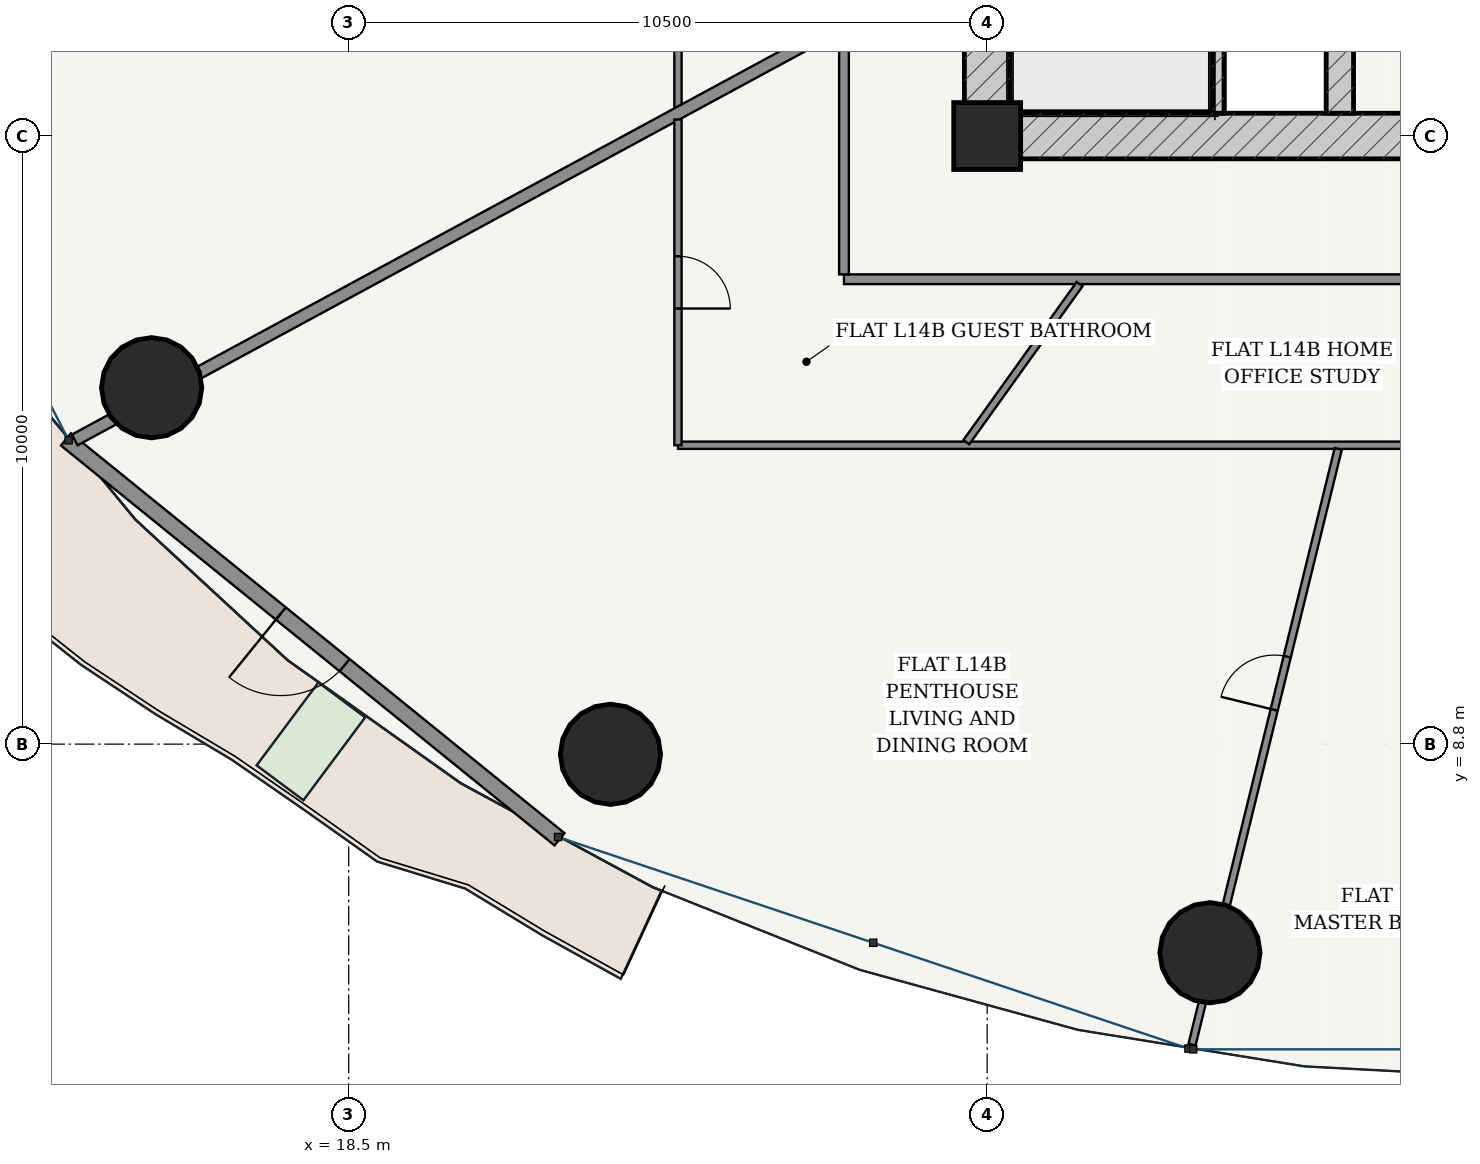
"""IFC4 building model, lengths in metres.
Left out: names, types, materials, properties, quantities, classifications, styles, units other than length and angle.
Written with IfcOpenShell. Run it as: python <this file> out.ifc"""

import sys

from ifc_helpers import new_model, si_unit, direction, frame, frame_2d, origin, origin_2d, place, context, subcontext, project, spatial, rectangle, hollow_circle, extrude, source, transform, mapped, element, fill, save


model = new_model("IFC4")
c1 = context("Model", 3, precision=1e-05, world=origin(), true_north=direction((-0.2419218956, 0.970295726276)))
c2 = subcontext(c1, "Body", "Model", "MODEL_VIEW")
j1 = project(units=[si_unit("LENGTHUNIT", "METRE"), si_unit("PLANEANGLEUNIT", "RADIAN")], contexts=[c1])
p1 = place(None, origin())
s1 = spatial("IfcSite", under=j1, at=p1, CompositionType="ELEMENT")
p2 = place(p1, origin())
s2 = spatial("IfcBuilding", under=s1, at=p2, CompositionType="ELEMENT")
p3 = place(p2, frame((0.0, 0.0, 56.4)))
s3 = spatial("IfcBuildingStorey", under=s2, at=p3, CompositionType="ELEMENT", Elevation=56.4)
p4 = place(p3, frame((29.0, 18.8, 0.0), z_axis=(0.0, 0.0, 1.0), x_axis=(1.0, 0.0, 0.0)))
e1 = element("IfcColumn", 1, at=p4, inside=s3, PredefinedType="COLUMN", context=c2, shape_type="SweptSolid", body=[
    extrude(rectangle(XDim=1.1, YDim=1.1, at=origin_2d()), origin(), (0.0, 0.0, 1.0), 3.6),
])
p5 = place(p3, frame((28.625, 18.8, 0.0), z_axis=(0.0, 0.0, 1.0), x_axis=(1.0, 0.0, 0.0)))
e2 = element("IfcWall", 2, at=p5, inside=s3, PredefinedType="SHEAR", context=c2, shape_type="SweptSolid", body=[
    extrude(rectangle(XDim=18.75, YDim=0.75, at=frame_2d((9.375, 0.0))), origin(), (0.0, 0.0, 1.0), 3.32),
])
p6 = place(p5, frame((8.95, 0.0, 0.0)))
e3 = element("IfcOpeningElement", 3, at=p6, cuts=e2, PredefinedType="OPENING", context=c2, shape_type="SweptSolid", body=[
    extrude(rectangle(XDim=0.85, YDim=2.1, at=frame_2d((0.425, 1.05))), frame((0.0, 0.385, 0.0), z_axis=(0.0, -1.0, 0.0), x_axis=(1.0, 0.0, 0.0)), (0.0, 0.0, 1.0), 0.77),
])
p7 = place(p3, frame((29.0, 19.175, 0.0), z_axis=(0.0, 0.0, 1.0), x_axis=(0.0, 1.0, 0.0)))
e4 = element("IfcWall", 4, at=p7, inside=s3, PredefinedType="SHEAR", context=c2, shape_type="SweptSolid", body=[
    extrude(rectangle(XDim=15.25, YDim=0.75, at=frame_2d((7.625, 0.0))), origin(), (0.0, 0.0, 1.0), 3.32),
])
p8 = place(p7, frame((9.875, 0.0, 0.0)))
e5 = element("IfcOpeningElement", 5, at=p8, cuts=e4, PredefinedType="OPENING", context=c2, shape_type="SweptSolid", body=[
    extrude(rectangle(XDim=1.5, YDim=2.2, at=frame_2d((0.75, 1.1))), frame((0.0, 0.385, 0.0), z_axis=(0.0, -1.0, 0.0), x_axis=(1.0, 0.0, 0.0)), (0.0, 0.0, 1.0), 0.77),
])
p9 = place(p3, frame((32.795, 19.175, 0.0), z_axis=(0.0, 0.0, 1.0), x_axis=(0.0, 1.0, 0.0)))
e6 = element("IfcWall", 6, at=p9, inside=s3, PredefinedType="SOLIDWALL", context=c2, shape_type="SweptSolid", body=[
    extrude(rectangle(XDim=7.375, YDim=0.2, at=frame_2d((3.688, 0.0))), origin(), (0.0, 0.0, 1.0), 3.32),
])
p10 = place(p3, frame((34.8, 19.175, 0.0), z_axis=(0.0, 0.0, 1.0), x_axis=(0.0, 1.0, 0.0)))
e7 = element("IfcWall", 7, at=p10, inside=s3, PredefinedType="SHEAR", context=c2, shape_type="SweptSolid", body=[
    extrude(rectangle(XDim=15.25, YDim=0.45, at=frame_2d((7.625, 0.0))), origin(), (0.0, 0.0, 1.0), 3.32),
])
p11 = place(p10, frame((7.8, 0.0, 0.0)))
e8 = element("IfcOpeningElement", 8, at=p11, cuts=e7, PredefinedType="OPENING", context=c2, shape_type="SweptSolid", body=[
    extrude(rectangle(XDim=1.05, YDim=2.15, at=frame_2d((0.525, 1.075))), frame((0.0, 0.235, 0.0), z_axis=(0.0, -1.0, 0.0), x_axis=(1.0, 0.0, 0.0)), (0.0, 0.0, 1.0), 0.47),
])
for number, where, z_axis, x_axis in (
    (9, (15.259, 14.661, 0.0), (0.0, 0.0, 1.0), (1.0, 0.0, 0.0)),
    (10, (22.805, 8.632, 0.0), (0.0, 0.0, 1.0), (1.0, 0.0, 0.0)),
    (11, (32.664, 5.37, 0.0), (0.0, 0.0, 1.0), (1.0, 0.0, 0.0)),
):
    element("IfcColumn", number, at=place(p3, frame(where, z_axis=z_axis, x_axis=x_axis)), inside=s3, PredefinedType="COLUMN", context=c2, shape_type="SweptSolid", body=[
        extrude(hollow_circle(Radius=0.825, WallThickness=0.05, at=origin_2d()), origin(), (0.0, 0.0, 1.0), 3.6),
    ])
p12 = place(p3, frame((13.85, 13.811, 0.0), z_axis=(0.0, 0.0, 1.0), x_axis=(0.777016782851, -0.629479879875, 0.0)))
e12 = element("IfcWall", 12, at=p12, inside=s3, PredefinedType="SOLIDWALL", context=c2, shape_type="SweptSolid", body=[
    extrude(rectangle(XDim=10.447, YDim=0.26, at=frame_2d((5.223, 0.0))), origin(), (0.0, 0.0, 1.0), 3.32),
])
p13 = place(p12, frame((4.548, 0.0, 0.0)))
e13 = element("IfcOpeningElement", 13, at=p13, cuts=e12, PredefinedType="OPENING", context=c2, shape_type="SweptSolid", body=[
    extrude(rectangle(XDim=1.35, YDim=2.2, at=frame_2d((0.675, 1.1))), frame((0.0, 0.14, 0.0), z_axis=(0.0, -1.0, 0.0), x_axis=(1.0, 0.0, 0.0)), (0.0, 0.0, 1.0), 0.28),
])
p14 = place(p3, frame((26.645, 16.445, 0.0), z_axis=(0.0, 0.0, 1.0), x_axis=(1.0, 0.0, 0.0)))
e14 = element("IfcWall", 14, at=p14, inside=s3, PredefinedType="PARTITIONING", context=c2, shape_type="SweptSolid", body=[
    extrude(rectangle(XDim=22.71, YDim=0.16, at=frame_2d((11.355, 0.0))), origin(), (0.0, 0.0, 1.0), 2.688),
])
p15 = place(p3, frame((26.645, 16.525, 0.0), z_axis=(0.0, 0.0, 1.0), x_axis=(0.0, 1.0, 0.0)))
e15 = element("IfcWall", 15, at=p15, inside=s3, PredefinedType="PARTITIONING", context=c2, shape_type="SweptSolid", body=[
    extrude(rectangle(XDim=20.55, YDim=0.16, at=frame_2d((10.275, 0.0))), origin(), (0.0, 0.0, 1.0), 2.688),
])
p16 = place(p15, frame((16.837, 0.0, 0.0)))
e16 = element("IfcOpeningElement", 16, at=p16, cuts=e15, PredefinedType="OPENING", context=c2, shape_type="SweptSolid", body=[
    extrude(rectangle(XDim=0.98, YDim=2.2, at=frame_2d((0.49, 1.1))), frame((0.0, 0.09, 0.0), z_axis=(0.0, -1.0, 0.0), x_axis=(1.0, 0.0, 0.0)), (0.0, 0.0, 1.0), 0.18),
])
p17 = place(p3, frame((23.915, 19.276, 0.0), z_axis=(0.0, 0.0, 1.0), x_axis=(0.0, 1.0, 0.0)))
e17 = element("IfcWall", 17, at=p17, inside=s3, PredefinedType="PARTITIONING", context=c2, shape_type="SweptSolid", body=[
    extrude(rectangle(XDim=20.609, YDim=0.12, at=frame_2d((10.305, 0.0))), origin(), (0.0, 0.0, 1.0), 2.688),
])
p18 = place(p17, frame((15.972, 0.0, 0.0)))
e18 = element("IfcOpeningElement", 18, at=p18, cuts=e17, PredefinedType="OPENING", context=c2, shape_type="SweptSolid", body=[
    extrude(rectangle(XDim=0.9, YDim=2.15, at=frame_2d((0.45, 1.075))), frame((0.0, 0.07, 0.0), z_axis=(0.0, -1.0, 0.0), x_axis=(1.0, 0.0, 0.0)), (0.0, 0.0, 1.0), 0.14),
])
p19 = place(p17, frame((3.058, 0.0, 0.0)))
e19 = element("IfcOpeningElement", 19, at=p19, cuts=e17, PredefinedType="OPENING", context=c2, shape_type="SweptSolid", body=[
    extrude(rectangle(XDim=0.9, YDim=2.15, at=frame_2d((0.45, 1.075))), frame((0.0, 0.07, 0.0), z_axis=(0.0, -1.0, 0.0), x_axis=(1.0, 0.0, 0.0)), (0.0, 0.0, 1.0), 0.14),
])
p20 = place(p3, frame((26.565, 20.608, 0.0), z_axis=(0.0, 0.0, 1.0), x_axis=(-0.879369737803, -0.476139542819, 0.0)))
e20 = element("IfcWall", 20, at=p20, inside=s3, PredefinedType="PARTITIONING", context=c2, shape_type="SweptSolid", body=[
    extrude(rectangle(XDim=14.295, YDim=0.2, at=frame_2d((7.147, 0.0))), origin(), (0.0, 0.0, 1.0), 2.688),
])
p21 = place(p3, frame((52.085, 13.715, 0.0), z_axis=(0.0, 0.0, 1.0), x_axis=(-1.0, 0.0, 0.0)))
e21 = element("IfcWall", 21, at=p21, inside=s3, PredefinedType="PARTITIONING", context=c2, shape_type="SweptSolid", body=[
    extrude(rectangle(XDim=28.17, YDim=0.12, at=frame_2d((14.085, 0.0))), origin(), (0.0, 0.0, 1.0), 2.688),
])
p22 = place(p21, frame((12.891, 0.0, 0.0)))
e22 = element("IfcOpeningElement", 22, at=p22, cuts=e21, PredefinedType="OPENING", context=c2, shape_type="SweptSolid", body=[
    extrude(rectangle(XDim=0.9, YDim=2.15, at=frame_2d((0.45, 1.075))), frame((0.0, 0.07, 0.0), z_axis=(0.0, -1.0, 0.0), x_axis=(1.0, 0.0, 0.0)), (0.0, 0.0, 1.0), 0.14),
])
p23 = place(p3, frame((23.915, 13.715, 0.0), z_axis=(0.0, 0.0, 1.0), x_axis=(0.0, 1.0, 0.0)))
e23 = element("IfcWall", 23, at=p23, inside=s3, PredefinedType="PARTITIONING", context=c2, shape_type="SweptSolid", body=[
    extrude(rectangle(XDim=5.356, YDim=0.12, at=frame_2d((2.678, 0.0))), origin(), (0.0, 0.0, 1.0), 2.999),
])
p24 = place(p23, frame((2.248, 0.0, 0.0)))
e24 = element("IfcOpeningElement", 24, at=p24, cuts=e23, PredefinedType="OPENING", context=c2, shape_type="SweptSolid", body=[
    extrude(rectangle(XDim=0.86, YDim=2.15, at=frame_2d((0.43, 1.075))), frame((0.0, 0.07, 0.0), z_axis=(0.0, -1.0, 0.0), x_axis=(1.0, 0.0, 0.0)), (0.0, 0.0, 1.0), 0.14),
])
p25 = place(p3, frame((34.773, 13.655, 0.0), z_axis=(0.0, 0.0, 1.0), x_axis=(-0.238375747469, -0.97117300365, 0.0)))
e25 = element("IfcWall", 25, at=p25, inside=s3, PredefinedType="PARTITIONING", context=c2, shape_type="SweptSolid", body=[
    extrude(rectangle(XDim=10.086, YDim=0.12, at=frame_2d((5.043, 0.0))), origin(), (0.0, 0.0, 1.0), 2.688),
])
p26 = place(p25, frame((3.518, 0.0, 0.0)))
e26 = element("IfcOpeningElement", 26, at=p26, cuts=e25, PredefinedType="OPENING", context=c2, shape_type="SweptSolid", body=[
    extrude(rectangle(XDim=0.9, YDim=2.15, at=frame_2d((0.45, 1.075))), frame((0.0, 0.07, 0.0), z_axis=(0.0, -1.0, 0.0), x_axis=(1.0, 0.0, 0.0)), (0.0, 0.0, 1.0), 0.14),
])
p27 = place(p3, frame((30.52, 16.365, 0.0), z_axis=(0.0, 0.0, 1.0), x_axis=(-0.582566008831, -0.812783393872, 0.0)))
e27 = element("IfcWall", 27, at=p27, inside=s3, PredefinedType="PARTITIONING", context=c2, shape_type="SweptSolid", body=[
    extrude(rectangle(XDim=3.198, YDim=0.12, at=frame_2d((1.599, 0.0))), origin(), (0.0, 0.0, 1.0), 3.32),
])
m1 = source(origin(), c2, "Body", "SweptSolid", [
    extrude(rectangle(XDim=1.35, YDim=2.2, at=frame_2d((0.675, 1.1))), frame((0.0, 0.025, 0.0), z_axis=(0.0, -1.0, 0.0), x_axis=(1.0, 0.0, 0.0)), (0.0, 0.0, 1.0), 0.05),
])
p28 = place(p13, frame((1.35, 0.0, 0.0), z_axis=(0.0, 0.0, 1.0), x_axis=(-1.0, 0.0, 0.0)))
e28 = element("IfcDoor", 28, at=p28, inside=s3, OperationType="SINGLE_SWING_RIGHT", PredefinedType="DOOR", context=c2, shape_type="MappedRepresentation", body=[
    mapped(m1, transform((0.0, 0.0, 0.0), scale=1.0)),
])
fill(e13, e28)
m2 = source(origin(), c2, "Body", "SweptSolid", [
    extrude(rectangle(XDim=0.9, YDim=2.15, at=frame_2d((0.45, 1.075))), frame((0.0, 0.025, 0.0), z_axis=(0.0, -1.0, 0.0), x_axis=(1.0, 0.0, 0.0)), (0.0, 0.0, 1.0), 0.05),
])
p29 = place(p26, frame((0.9, 0.0, 0.0), z_axis=(0.0, 0.0, 1.0), x_axis=(-1.0, 0.0, 0.0)))
e29 = element("IfcDoor", 29, at=p29, inside=s3, OperationType="SINGLE_SWING_LEFT", PredefinedType="DOOR", context=c2, shape_type="MappedRepresentation", body=[
    mapped(m2, transform((0.0, 0.0, 0.0), scale=1.0)),
])
fill(e26, e29)
m3 = source(origin(), c2, "Body", "SweptSolid", [
    extrude(rectangle(XDim=0.86, YDim=2.15, at=frame_2d((0.43, 1.075))), frame((0.0, 0.025, 0.0), z_axis=(0.0, -1.0, 0.0), x_axis=(1.0, 0.0, 0.0)), (0.0, 0.0, 1.0), 0.05),
])
p30 = place(p24, frame((0.86, 0.0, 0.0), z_axis=(0.0, 0.0, 1.0), x_axis=(-1.0, 0.0, 0.0)))
e30 = element("IfcDoor", 30, at=p30, inside=s3, OperationType="SINGLE_SWING_RIGHT", PredefinedType="DOOR", context=c2, shape_type="MappedRepresentation", body=[
    mapped(m3, transform((0.0, 0.0, 0.0), scale=1.0)),
])
fill(e24, e30)
save(model, sys.argv[1])
